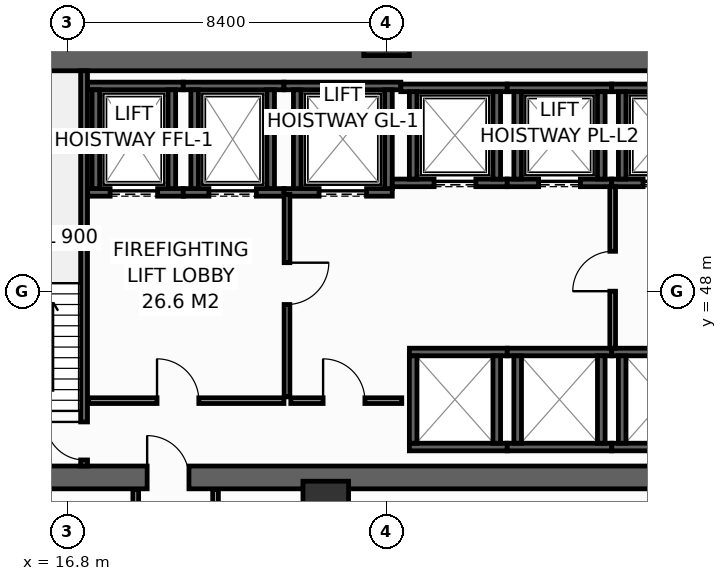
"""IFC4 building model, lengths in metres.
Left out: names, types, materials, properties, quantities, classifications, styles, units other than length and angle.
Written with IfcOpenShell. Run it as: python <this file> out.ifc"""

import sys

from ifc_helpers import new_model, si_unit, direction, frame, frame_2d, origin, origin_2d, place, context, subcontext, project, spatial, rectangle, hollow_rectangle, extrude, element, fill, save


model = new_model("IFC4")
c1 = context("Model", 3, precision=1e-05, world=origin(), true_north=direction((0.0, 1.0)))
c2 = subcontext(c1, "Body", "Model", "MODEL_VIEW")
j1 = project(units=[si_unit("LENGTHUNIT", "METRE"), si_unit("PLANEANGLEUNIT", "RADIAN")], contexts=[c1])
p1 = place(None, origin())
s1 = spatial("IfcSite", under=j1, at=p1, CompositionType="ELEMENT")
p2 = place(p1, origin())
s2 = spatial("IfcBuilding", under=s1, at=p2, CompositionType="ELEMENT")
p3 = place(p2, frame((0.0, 0.0, 69.2)))
s3 = spatial("IfcBuildingStorey", under=s2, at=p3, CompositionType="ELEMENT", Elevation=69.2)
p4 = place(p3, frame((13.5, 43.1, 0.0), z_axis=(0.0, 0.0, 1.0), x_axis=(1.0, 0.0, 0.0)))
e1 = element("IfcWall", 1, at=p4, inside=s3, PredefinedType="SHEAR", context=c2, shape_type="SweptSolid", body=[
    extrude(rectangle(XDim=32.9, YDim=0.6, at=frame_2d((16.45, 0.0))), origin(), (0.0, 0.0, 1.0), 4.15),
])
p5 = place(p4, frame((5.4, 0.0, 0.0)))
e2 = element("IfcOpeningElement", 2, at=p5, cuts=e1, PredefinedType="OPENING", context=c2, shape_type="SweptSolid", body=[
    extrude(rectangle(XDim=1.1, YDim=2.15, at=frame_2d((0.55, 1.075))), frame((0.0, 0.31, 0.0), z_axis=(0.0, -1.0, 0.0), x_axis=(1.0, 0.0, 0.0)), (0.0, 0.0, 1.0), 0.62),
])
p6 = place(p4, frame((25.6, 0.0, 0.0)))
e3 = element("IfcOpeningElement", 3, at=p6, cuts=e1, PredefinedType="OPENING", context=c2, shape_type="SweptSolid", body=[
    extrude(rectangle(XDim=1.1, YDim=2.15, at=frame_2d((0.55, 1.075))), frame((0.0, 0.31, 0.0), z_axis=(0.0, -1.0, 0.0), x_axis=(1.0, 0.0, 0.0)), (0.0, 0.0, 1.0), 0.62),
])
p7 = place(p3, frame((13.5, 54.1, 0.0), z_axis=(0.0, 0.0, 1.0), x_axis=(1.0, 0.0, 0.0)))
e4 = element("IfcWall", 4, at=p7, inside=s3, PredefinedType="SHEAR", context=c2, shape_type="SweptSolid", body=[
    extrude(rectangle(XDim=32.9, YDim=0.6, at=frame_2d((16.45, 0.0))), origin(), (0.0, 0.0, 1.0), 4.15),
])
for number, where, z_axis, x_axis in (
    (5, (25.2, 54.8, 0.0), (0.0, 0.0, 1.0), (1.0, 0.0, 0.0)),
    (6, (23.6, 42.4, 0.0), (0.0, 0.0, 1.0), (1.0, 0.0, 0.0)),
):
    element("IfcColumn", number, at=place(p3, frame(where, z_axis=z_axis, x_axis=x_axis)), inside=s3, PredefinedType="COLUMN", context=c2, shape_type="SweptSolid", body=[
        extrude(hollow_rectangle(XDim=1.2, YDim=1.2, WallThickness=0.055, at=origin_2d()), origin(), (0.0, 0.0, 1.0), 4.4),
    ])
p8 = place(p3, frame((17.33, 50.6, 0.0), z_axis=(0.0, 0.0, 1.0), x_axis=(1.0, 0.0, 0.0)))
e7 = element("IfcWall", 7, at=p8, inside=s3, PredefinedType="SHEAR", context=c2, shape_type="SweptSolid", body=[
    extrude(rectangle(XDim=2.52, YDim=0.2, at=frame_2d((1.26, 0.0))), origin(), (0.0, 0.0, 1.0), 4.15),
])
p9 = place(p8, frame((0.595, 0.0, 0.0)))
e8 = element("IfcOpeningElement", 8, at=p9, cuts=e7, PredefinedType="OPENING", context=c2, shape_type="SweptSolid", body=[
    extrude(rectangle(XDim=1.25, YDim=2.3, at=frame_2d((0.625, 1.15))), frame((0.0, 0.11, 0.0), z_axis=(0.0, -1.0, 0.0), x_axis=(1.0, 0.0, 0.0)), (0.0, 0.0, 1.0), 0.22),
])
p10 = place(p3, frame((17.33, 53.4, 0.0), z_axis=(0.0, 0.0, 1.0), x_axis=(1.0, 0.0, 0.0)))
e9 = element("IfcWall", 9, at=p10, inside=s3, PredefinedType="SHEAR", context=c2, shape_type="SweptSolid", body=[
    extrude(rectangle(XDim=2.52, YDim=0.2, at=frame_2d((1.26, 0.0))), origin(), (0.0, 0.0, 1.0), 4.15),
])
for number, where, z_axis, x_axis in (
    (10, (17.55, 50.7, 0.0), (0.0, 0.0, 1.0), (0.0, 1.0, 0.0)),
    (11, (19.55, 50.7, 0.0), (0.0, 0.0, 1.0), (0.0, 1.0, 0.0)),
):
    element("IfcWall", number, at=place(p3, frame(where, z_axis=z_axis, x_axis=x_axis)), inside=s3, PredefinedType="SHEAR", context=c2, shape_type="SweptSolid", body=[
        extrude(rectangle(XDim=2.6, YDim=0.2, at=frame_2d((1.3, 0.0))), origin(), (0.0, 0.0, 1.0), 4.15),
    ])
p11 = place(p3, frame((19.85, 50.6, 0.0), z_axis=(0.0, 0.0, 1.0), x_axis=(1.0, 0.0, 0.0)))
e12 = element("IfcWall", 12, at=p11, inside=s3, PredefinedType="SHEAR", context=c2, shape_type="SweptSolid", body=[
    extrude(rectangle(XDim=2.65, YDim=0.2, at=frame_2d((1.325, 0.0))), origin(), (0.0, 0.0, 1.0), 4.15),
])
p12 = place(p11, frame((0.675, 0.0, 0.0)))
e13 = element("IfcOpeningElement", 13, at=p12, cuts=e12, PredefinedType="OPENING", context=c2, shape_type="SweptSolid", body=[
    extrude(rectangle(XDim=1.25, YDim=2.3, at=frame_2d((0.625, 1.15))), frame((0.0, 0.11, 0.0), z_axis=(0.0, -1.0, 0.0), x_axis=(1.0, 0.0, 0.0)), (0.0, 0.0, 1.0), 0.22),
])
p13 = place(p3, frame((19.85, 53.4, 0.0), z_axis=(0.0, 0.0, 1.0), x_axis=(1.0, 0.0, 0.0)))
e14 = element("IfcWall", 14, at=p13, inside=s3, PredefinedType="SHEAR", context=c2, shape_type="SweptSolid", body=[
    extrude(rectangle(XDim=2.65, YDim=0.2, at=frame_2d((1.325, 0.0))), origin(), (0.0, 0.0, 1.0), 4.15),
])
for number, where, z_axis, x_axis in (
    (15, (20.15, 50.7, 0.0), (0.0, 0.0, 1.0), (0.0, 1.0, 0.0)),
    (16, (22.15, 50.7, 0.0), (0.0, 0.0, 1.0), (0.0, 1.0, 0.0)),
):
    element("IfcWall", number, at=place(p3, frame(where, z_axis=z_axis, x_axis=x_axis)), inside=s3, PredefinedType="SHEAR", context=c2, shape_type="SweptSolid", body=[
        extrude(rectangle(XDim=2.6, YDim=0.2, at=frame_2d((1.3, 0.0))), origin(), (0.0, 0.0, 1.0), 4.15),
    ])
p14 = place(p3, frame((22.5, 50.6, 0.0), z_axis=(0.0, 0.0, 1.0), x_axis=(1.0, 0.0, 0.0)))
e17 = element("IfcWall", 17, at=p14, inside=s3, PredefinedType="SHEAR", context=c2, shape_type="SweptSolid", body=[
    extrude(rectangle(XDim=2.85, YDim=0.2, at=frame_2d((1.425, 0.0))), origin(), (0.0, 0.0, 1.0), 4.15),
])
p15 = place(p14, frame((0.925, 0.0, 0.0)))
e18 = element("IfcOpeningElement", 18, at=p15, cuts=e17, PredefinedType="OPENING", context=c2, shape_type="SweptSolid", body=[
    extrude(rectangle(XDim=1.25, YDim=2.3, at=frame_2d((0.625, 1.15))), frame((0.0, 0.11, 0.0), z_axis=(0.0, -1.0, 0.0), x_axis=(1.0, 0.0, 0.0)), (0.0, 0.0, 1.0), 0.22),
])
p16 = place(p3, frame((22.5, 53.4, 0.0), z_axis=(0.0, 0.0, 1.0), x_axis=(1.0, 0.0, 0.0)))
e19 = element("IfcWall", 19, at=p16, inside=s3, PredefinedType="SHEAR", context=c2, shape_type="SweptSolid", body=[
    extrude(rectangle(XDim=3.075, YDim=0.2, at=frame_2d((1.538, 0.0))), origin(), (0.0, 0.0, 1.0), 4.15),
])
for number, where, z_axis, x_axis in (
    (20, (22.85, 50.7, 0.0), (0.0, 0.0, 1.0), (0.0, 1.0, 0.0)),
    (21, (25.25, 50.7, 0.0), (0.0, 0.0, 1.0), (0.0, 1.0, 0.0)),
):
    element("IfcWall", number, at=place(p3, frame(where, z_axis=z_axis, x_axis=x_axis)), inside=s3, PredefinedType="SHEAR", context=c2, shape_type="SweptSolid", body=[
        extrude(rectangle(XDim=2.6, YDim=0.2, at=frame_2d((1.3, 0.0))), origin(), (0.0, 0.0, 1.0), 4.15),
    ])
p17 = place(p3, frame((25.35, 50.85, 0.0), z_axis=(0.0, 0.0, 1.0), x_axis=(1.0, 0.0, 0.0)))
e22 = element("IfcWall", 22, at=p17, inside=s3, PredefinedType="SHEAR", context=c2, shape_type="SweptSolid", body=[
    extrude(rectangle(XDim=3.025, YDim=0.2, at=frame_2d((1.512, 0.0))), origin(), (0.0, 0.0, 1.0), 4.15),
])
p18 = place(p17, frame((1.1, 0.0, 0.0)))
e23 = element("IfcOpeningElement", 23, at=p18, cuts=e22, PredefinedType="OPENING", context=c2, shape_type="SweptSolid", body=[
    extrude(rectangle(XDim=1.1, YDim=2.2, at=frame_2d((0.55, 1.1))), frame((0.0, 0.11, 0.0), z_axis=(0.0, -1.0, 0.0), x_axis=(1.0, 0.0, 0.0)), (0.0, 0.0, 1.0), 0.22),
])
p19 = place(p3, frame((25.575, 53.35, 0.0), z_axis=(0.0, 0.0, 1.0), x_axis=(1.0, 0.0, 0.0)))
e24 = element("IfcWall", 24, at=p19, inside=s3, PredefinedType="SHEAR", context=c2, shape_type="SweptSolid", body=[
    extrude(rectangle(XDim=2.8, YDim=0.2, at=frame_2d((1.4, 0.0))), origin(), (0.0, 0.0, 1.0), 4.15),
])
for number, where, z_axis, x_axis in (
    (25, (25.9, 50.95, 0.0), (0.0, 0.0, 1.0), (0.0, 1.0, 0.0)),
    (26, (28.1, 50.95, 0.0), (0.0, 0.0, 1.0), (0.0, 1.0, 0.0)),
):
    element("IfcWall", number, at=place(p3, frame(where, z_axis=z_axis, x_axis=x_axis)), inside=s3, PredefinedType="SHEAR", context=c2, shape_type="SweptSolid", body=[
        extrude(rectangle(XDim=2.3, YDim=0.2, at=frame_2d((1.15, 0.0))), origin(), (0.0, 0.0, 1.0), 4.15),
    ])
p20 = place(p3, frame((28.375, 50.85, 0.0), z_axis=(0.0, 0.0, 1.0), x_axis=(1.0, 0.0, 0.0)))
e27 = element("IfcWall", 27, at=p20, inside=s3, PredefinedType="SHEAR", context=c2, shape_type="SweptSolid", body=[
    extrude(rectangle(XDim=2.75, YDim=0.2, at=frame_2d((1.375, 0.0))), origin(), (0.0, 0.0, 1.0), 4.15),
])
p21 = place(p20, frame((0.825, 0.0, 0.0)))
e28 = element("IfcOpeningElement", 28, at=p21, cuts=e27, PredefinedType="OPENING", context=c2, shape_type="SweptSolid", body=[
    extrude(rectangle(XDim=1.1, YDim=2.2, at=frame_2d((0.55, 1.1))), frame((0.0, 0.11, 0.0), z_axis=(0.0, -1.0, 0.0), x_axis=(1.0, 0.0, 0.0)), (0.0, 0.0, 1.0), 0.22),
])
p22 = place(p3, frame((28.375, 53.35, 0.0), z_axis=(0.0, 0.0, 1.0), x_axis=(1.0, 0.0, 0.0)))
e29 = element("IfcWall", 29, at=p22, inside=s3, PredefinedType="SHEAR", context=c2, shape_type="SweptSolid", body=[
    extrude(rectangle(XDim=2.75, YDim=0.2, at=frame_2d((1.375, 0.0))), origin(), (0.0, 0.0, 1.0), 4.15),
])
for number, where, z_axis, x_axis in (
    (30, (28.65, 50.95, 0.0), (0.0, 0.0, 1.0), (0.0, 1.0, 0.0)),
    (31, (30.85, 50.95, 0.0), (0.0, 0.0, 1.0), (0.0, 1.0, 0.0)),
):
    element("IfcWall", number, at=place(p3, frame(where, z_axis=z_axis, x_axis=x_axis)), inside=s3, PredefinedType="SHEAR", context=c2, shape_type="SweptSolid", body=[
        extrude(rectangle(XDim=2.3, YDim=0.2, at=frame_2d((1.15, 0.0))), origin(), (0.0, 0.0, 1.0), 4.15),
    ])
p23 = place(p3, frame((31.125, 50.85, 0.0), z_axis=(0.0, 0.0, 1.0), x_axis=(1.0, 0.0, 0.0)))
e32 = element("IfcWall", 32, at=p23, inside=s3, PredefinedType="SHEAR", context=c2, shape_type="SweptSolid", body=[
    extrude(rectangle(XDim=2.825, YDim=0.2, at=frame_2d((1.413, 0.0))), origin(), (0.0, 0.0, 1.0), 4.15),
])
p24 = place(p23, frame((0.825, 0.0, 0.0)))
e33 = element("IfcOpeningElement", 33, at=p24, cuts=e32, PredefinedType="OPENING", context=c2, shape_type="SweptSolid", body=[
    extrude(rectangle(XDim=1.1, YDim=2.2, at=frame_2d((0.55, 1.1))), frame((0.0, 0.11, 0.0), z_axis=(0.0, -1.0, 0.0), x_axis=(1.0, 0.0, 0.0)), (0.0, 0.0, 1.0), 0.22),
])
p25 = place(p3, frame((31.125, 53.35, 0.0), z_axis=(0.0, 0.0, 1.0), x_axis=(1.0, 0.0, 0.0)))
e34 = element("IfcWall", 34, at=p25, inside=s3, PredefinedType="SHEAR", context=c2, shape_type="SweptSolid", body=[
    extrude(rectangle(XDim=2.825, YDim=0.2, at=frame_2d((1.413, 0.0))), origin(), (0.0, 0.0, 1.0), 4.15),
])
p26 = place(p3, frame((31.4, 50.95, 0.0), z_axis=(0.0, 0.0, 1.0), x_axis=(0.0, 1.0, 0.0)))
e35 = element("IfcWall", 35, at=p26, inside=s3, PredefinedType="SHEAR", context=c2, shape_type="SweptSolid", body=[
    extrude(rectangle(XDim=2.3, YDim=0.2, at=frame_2d((1.15, 0.0))), origin(), (0.0, 0.0, 1.0), 4.15),
])
for number, where, z_axis, x_axis in (
    (36, (25.8, 43.9, 0.0), (0.0, 0.0, 1.0), (1.0, 0.0, 0.0)),
    (37, (25.8, 46.4, 0.0), (0.0, 0.0, 1.0), (1.0, 0.0, 0.0)),
):
    element("IfcWall", number, at=place(p3, frame(where, z_axis=z_axis, x_axis=x_axis)), inside=s3, PredefinedType="SHEAR", context=c2, shape_type="SweptSolid", body=[
        extrude(rectangle(XDim=2.575, YDim=0.2, at=frame_2d((1.288, 0.0))), origin(), (0.0, 0.0, 1.0), 4.15),
    ])
for number, where, z_axis, x_axis in (
    (38, (25.9, 44.0, 0.0), (0.0, 0.0, 1.0), (0.0, 1.0, 0.0)),
    (39, (28.1, 44.0, 0.0), (0.0, 0.0, 1.0), (0.0, 1.0, 0.0)),
):
    element("IfcWall", number, at=place(p3, frame(where, z_axis=z_axis, x_axis=x_axis)), inside=s3, PredefinedType="SHEAR", context=c2, shape_type="SweptSolid", body=[
        extrude(rectangle(XDim=2.3, YDim=0.2, at=frame_2d((1.15, 0.0))), origin(), (0.0, 0.0, 1.0), 4.15),
    ])
for number, where, z_axis, x_axis in (
    (40, (28.375, 43.9, 0.0), (0.0, 0.0, 1.0), (1.0, 0.0, 0.0)),
    (41, (28.375, 46.4, 0.0), (0.0, 0.0, 1.0), (1.0, 0.0, 0.0)),
):
    element("IfcWall", number, at=place(p3, frame(where, z_axis=z_axis, x_axis=x_axis)), inside=s3, PredefinedType="SHEAR", context=c2, shape_type="SweptSolid", body=[
        extrude(rectangle(XDim=2.75, YDim=0.2, at=frame_2d((1.375, 0.0))), origin(), (0.0, 0.0, 1.0), 4.15),
    ])
for number, where, z_axis, x_axis in (
    (42, (28.65, 44.0, 0.0), (0.0, 0.0, 1.0), (0.0, 1.0, 0.0)),
    (43, (30.85, 44.0, 0.0), (0.0, 0.0, 1.0), (0.0, 1.0, 0.0)),
):
    element("IfcWall", number, at=place(p3, frame(where, z_axis=z_axis, x_axis=x_axis)), inside=s3, PredefinedType="SHEAR", context=c2, shape_type="SweptSolid", body=[
        extrude(rectangle(XDim=2.3, YDim=0.2, at=frame_2d((1.15, 0.0))), origin(), (0.0, 0.0, 1.0), 4.15),
    ])
for number, where, z_axis, x_axis in (
    (44, (31.125, 43.9, 0.0), (0.0, 0.0, 1.0), (1.0, 0.0, 0.0)),
    (45, (31.125, 46.4, 0.0), (0.0, 0.0, 1.0), (1.0, 0.0, 0.0)),
):
    element("IfcWall", number, at=place(p3, frame(where, z_axis=z_axis, x_axis=x_axis)), inside=s3, PredefinedType="SHEAR", context=c2, shape_type="SweptSolid", body=[
        extrude(rectangle(XDim=2.575, YDim=0.2, at=frame_2d((1.288, 0.0))), origin(), (0.0, 0.0, 1.0), 4.15),
    ])
p27 = place(p3, frame((31.4, 44.0, 0.0), z_axis=(0.0, 0.0, 1.0), x_axis=(0.0, 1.0, 0.0)))
e46 = element("IfcWall", 46, at=p27, inside=s3, PredefinedType="SHEAR", context=c2, shape_type="SweptSolid", body=[
    extrude(rectangle(XDim=2.3, YDim=0.2, at=frame_2d((1.15, 0.0))), origin(), (0.0, 0.0, 1.0), 4.15),
])
p28 = place(p3, frame((17.24, 43.4, 0.0), z_axis=(0.0, 0.0, 1.0), x_axis=(0.0, 1.0, 0.0)))
e47 = element("IfcWall", 47, at=p28, inside=s3, PredefinedType="SHEAR", context=c2, shape_type="SweptSolid", body=[
    extrude(rectangle(XDim=10.4, YDim=0.18, at=frame_2d((5.2, 0.0))), origin(), (0.0, 0.0, 1.0), 4.15),
])
p29 = place(p28, frame((0.16, 0.0, 0.0)))
e48 = element("IfcOpeningElement", 48, at=p29, cuts=e47, PredefinedType="OPENING", context=c2, shape_type="SweptSolid", body=[
    extrude(rectangle(XDim=1.0, YDim=2.15, at=frame_2d((0.5, 1.075))), frame((0.0, 0.1, 0.0), z_axis=(0.0, -1.0, 0.0), x_axis=(1.0, 0.0, 0.0)), (0.0, 0.0, 1.0), 0.2),
])
p30 = place(p3, frame((17.36, 45.12, 0.0), z_axis=(0.0, 0.0, 1.0), x_axis=(1.0, 0.0, 0.0)))
e49 = element("IfcWall", 49, at=p30, inside=s3, PredefinedType="PARTITIONING", context=c2, shape_type="SweptSolid", body=[
    extrude(rectangle(XDim=5.14, YDim=0.15, at=frame_2d((2.57, 0.0))), origin(), (0.0, 0.0, 1.0), 4.15),
])
p31 = place(p30, frame((1.8, 0.0, 0.0)))
e50 = element("IfcOpeningElement", 50, at=p31, cuts=e49, PredefinedType="OPENING", context=c2, shape_type="SweptSolid", body=[
    extrude(rectangle(XDim=1.1, YDim=2.15, at=frame_2d((0.55, 1.075))), frame((0.0, 0.085, 0.0), z_axis=(0.0, -1.0, 0.0), x_axis=(1.0, 0.0, 0.0)), (0.0, 0.0, 1.0), 0.17),
])
p32 = place(p3, frame((22.58, 50.55, 0.0), z_axis=(0.0, 0.0, 1.0), x_axis=(0.0, -1.0, 0.0)))
e51 = element("IfcWall", 51, at=p32, inside=s3, PredefinedType="PARTITIONING", context=c2, shape_type="SweptSolid", body=[
    extrude(rectangle(XDim=5.33, YDim=0.15, at=frame_2d((2.665, 0.0))), origin(), (0.0, 0.0, 1.0), 4.15),
])
p33 = place(p32, frame((1.8, 0.0, 0.0)))
e52 = element("IfcOpeningElement", 52, at=p33, cuts=e51, PredefinedType="OPENING", context=c2, shape_type="SweptSolid", body=[
    extrude(rectangle(XDim=1.1, YDim=2.15, at=frame_2d((0.55, 1.075))), frame((0.0, 0.085, 0.0), z_axis=(0.0, -1.0, 0.0), x_axis=(1.0, 0.0, 0.0)), (0.0, 0.0, 1.0), 0.17),
])
p34 = place(p3, frame((22.68, 45.12, 0.0), z_axis=(0.0, 0.0, 1.0), x_axis=(1.0, 0.0, 0.0)))
e53 = element("IfcWall", 53, at=p34, inside=s3, PredefinedType="PARTITIONING", context=c2, shape_type="SweptSolid", body=[
    extrude(rectangle(XDim=2.92, YDim=0.15, at=frame_2d((1.46, 0.0))), origin(), (0.0, 0.0, 1.0), 4.15),
])
p35 = place(p34, frame((0.85, 0.0, 0.0)))
e54 = element("IfcOpeningElement", 54, at=p35, cuts=e53, PredefinedType="OPENING", context=c2, shape_type="SweptSolid", body=[
    extrude(rectangle(XDim=1.1, YDim=2.15, at=frame_2d((0.55, 1.075))), frame((0.0, 0.085, 0.0), z_axis=(0.0, -1.0, 0.0), x_axis=(1.0, 0.0, 0.0)), (0.0, 0.0, 1.0), 0.17),
])
p36 = place(p3, frame((31.15, 46.5, 0.0), z_axis=(0.0, 0.0, 1.0), x_axis=(0.0, 1.0, 0.0)))
e55 = element("IfcWall", 55, at=p36, inside=s3, PredefinedType="PARTITIONING", context=c2, shape_type="SweptSolid", body=[
    extrude(rectangle(XDim=4.25, YDim=0.15, at=frame_2d((2.125, 0.0))), origin(), (0.0, 0.0, 1.0), 4.15),
])
p37 = place(p36, frame((1.5, 0.0, 0.0)))
e56 = element("IfcOpeningElement", 56, at=p37, cuts=e55, PredefinedType="OPENING", context=c2, shape_type="SweptSolid", body=[
    extrude(rectangle(XDim=1.05, YDim=2.15, at=frame_2d((0.525, 1.075))), frame((0.0, 0.085, 0.0), z_axis=(0.0, -1.0, 0.0), x_axis=(1.0, 0.0, 0.0)), (0.0, 0.0, 1.0), 0.17),
])
for number, where, z_axis, x_axis in (
    (57, (18.6, 40.85, 0.0), (0.0, 0.0, 1.0), (0.0, 1.0, 0.0)),
    (58, (20.7, 40.85, 0.0), (0.0, 0.0, 1.0), (0.0, 1.0, 0.0)),
):
    element("IfcWall", number, at=place(p3, frame(where, z_axis=z_axis, x_axis=x_axis)), inside=s3, PredefinedType="PARTITIONING", context=c2, shape_type="SweptSolid", body=[
        extrude(rectangle(XDim=1.93, YDim=0.15, at=frame_2d((0.965, 0.0))), origin(), (0.0, 0.0, 1.0), 4.15),
    ])
p38 = place(p9, origin())
e59 = element("IfcDoor", 59, at=p38, inside=s3, OperationType="SLIDING_TO_LEFT", PredefinedType="DOOR", context=c2, shape_type="SweptSolid", body=[
    extrude(rectangle(XDim=1.25, YDim=2.3, at=frame_2d((0.625, 1.15))), frame((0.0, 0.025, 0.0), z_axis=(0.0, -1.0, 0.0), x_axis=(1.0, 0.0, 0.0)), (0.0, 0.0, 1.0), 0.05),
])
fill(e8, e59)
p39 = place(p12, origin())
e60 = element("IfcDoor", 60, at=p39, inside=s3, OperationType="SLIDING_TO_LEFT", PredefinedType="DOOR", context=c2, shape_type="SweptSolid", body=[
    extrude(rectangle(XDim=1.25, YDim=2.3, at=frame_2d((0.625, 1.15))), frame((0.0, 0.025, 0.0), z_axis=(0.0, -1.0, 0.0), x_axis=(1.0, 0.0, 0.0)), (0.0, 0.0, 1.0), 0.05),
])
fill(e13, e60)
p40 = place(p15, origin())
e61 = element("IfcDoor", 61, at=p40, inside=s3, OperationType="SLIDING_TO_LEFT", PredefinedType="DOOR", context=c2, shape_type="SweptSolid", body=[
    extrude(rectangle(XDim=1.25, YDim=2.3, at=frame_2d((0.625, 1.15))), frame((0.0, 0.025, 0.0), z_axis=(0.0, -1.0, 0.0), x_axis=(1.0, 0.0, 0.0)), (0.0, 0.0, 1.0), 0.05),
])
fill(e18, e61)
p41 = place(p18, origin())
e62 = element("IfcDoor", 62, at=p41, inside=s3, OperationType="SLIDING_TO_LEFT", PredefinedType="DOOR", context=c2, shape_type="SweptSolid", body=[
    extrude(rectangle(XDim=1.1, YDim=2.2, at=frame_2d((0.55, 1.1))), frame((0.0, 0.025, 0.0), z_axis=(0.0, -1.0, 0.0), x_axis=(1.0, 0.0, 0.0)), (0.0, 0.0, 1.0), 0.05),
])
fill(e23, e62)
p42 = place(p21, origin())
e63 = element("IfcDoor", 63, at=p42, inside=s3, OperationType="SLIDING_TO_LEFT", PredefinedType="DOOR", context=c2, shape_type="SweptSolid", body=[
    extrude(rectangle(XDim=1.1, YDim=2.2, at=frame_2d((0.55, 1.1))), frame((0.0, 0.025, 0.0), z_axis=(0.0, -1.0, 0.0), x_axis=(1.0, 0.0, 0.0)), (0.0, 0.0, 1.0), 0.05),
])
fill(e28, e63)
p43 = place(p24, origin())
e64 = element("IfcDoor", 64, at=p43, inside=s3, OperationType="SLIDING_TO_LEFT", PredefinedType="DOOR", context=c2, shape_type="SweptSolid", body=[
    extrude(rectangle(XDim=1.1, YDim=2.2, at=frame_2d((0.55, 1.1))), frame((0.0, 0.025, 0.0), z_axis=(0.0, -1.0, 0.0), x_axis=(1.0, 0.0, 0.0)), (0.0, 0.0, 1.0), 0.05),
])
fill(e33, e64)
p44 = place(p29, origin())
e65 = element("IfcDoor", 65, at=p44, inside=s3, OperationType="SINGLE_SWING_RIGHT", PredefinedType="DOOR", context=c2, shape_type="SweptSolid", body=[
    extrude(rectangle(XDim=1.0, YDim=2.15, at=frame_2d((0.5, 1.075))), frame((0.0, 0.025, 0.0), z_axis=(0.0, -1.0, 0.0), x_axis=(1.0, 0.0, 0.0)), (0.0, 0.0, 1.0), 0.05),
])
fill(e48, e65)
p45 = place(p31, origin())
e66 = element("IfcDoor", 66, at=p45, inside=s3, OperationType="SINGLE_SWING_LEFT", PredefinedType="DOOR", context=c2, shape_type="SweptSolid", body=[
    extrude(rectangle(XDim=1.1, YDim=2.15, at=frame_2d((0.55, 1.075))), frame((0.0, 0.025, 0.0), z_axis=(0.0, -1.0, 0.0), x_axis=(1.0, 0.0, 0.0)), (0.0, 0.0, 1.0), 0.05),
])
fill(e50, e66)
p46 = place(p33, origin())
e67 = element("IfcDoor", 67, at=p46, inside=s3, OperationType="SINGLE_SWING_LEFT", PredefinedType="DOOR", context=c2, shape_type="SweptSolid", body=[
    extrude(rectangle(XDim=1.1, YDim=2.15, at=frame_2d((0.55, 1.075))), frame((0.0, 0.025, 0.0), z_axis=(0.0, -1.0, 0.0), x_axis=(1.0, 0.0, 0.0)), (0.0, 0.0, 1.0), 0.05),
])
fill(e52, e67)
p47 = place(p35, origin())
e68 = element("IfcDoor", 68, at=p47, inside=s3, OperationType="SINGLE_SWING_LEFT", PredefinedType="DOOR", context=c2, shape_type="SweptSolid", body=[
    extrude(rectangle(XDim=1.1, YDim=2.15, at=frame_2d((0.55, 1.075))), frame((0.0, 0.025, 0.0), z_axis=(0.0, -1.0, 0.0), x_axis=(1.0, 0.0, 0.0)), (0.0, 0.0, 1.0), 0.05),
])
fill(e54, e68)
p48 = place(p5, origin())
e69 = element("IfcDoor", 69, at=p48, inside=s3, OperationType="SINGLE_SWING_LEFT", PredefinedType="DOOR", context=c2, shape_type="SweptSolid", body=[
    extrude(rectangle(XDim=1.1, YDim=2.15, at=frame_2d((0.55, 1.075))), frame((0.0, 0.025, 0.0), z_axis=(0.0, -1.0, 0.0), x_axis=(1.0, 0.0, 0.0)), (0.0, 0.0, 1.0), 0.05),
])
fill(e2, e69)
p49 = place(p37, origin())
e70 = element("IfcDoor", 70, at=p49, inside=s3, OperationType="SINGLE_SWING_LEFT", PredefinedType="DOOR", context=c2, shape_type="SweptSolid", body=[
    extrude(rectangle(XDim=1.05, YDim=2.15, at=frame_2d((0.525, 1.075))), frame((0.0, 0.025, 0.0), z_axis=(0.0, -1.0, 0.0), x_axis=(1.0, 0.0, 0.0)), (0.0, 0.0, 1.0), 0.05),
])
fill(e56, e70)
save(model, sys.argv[1])
